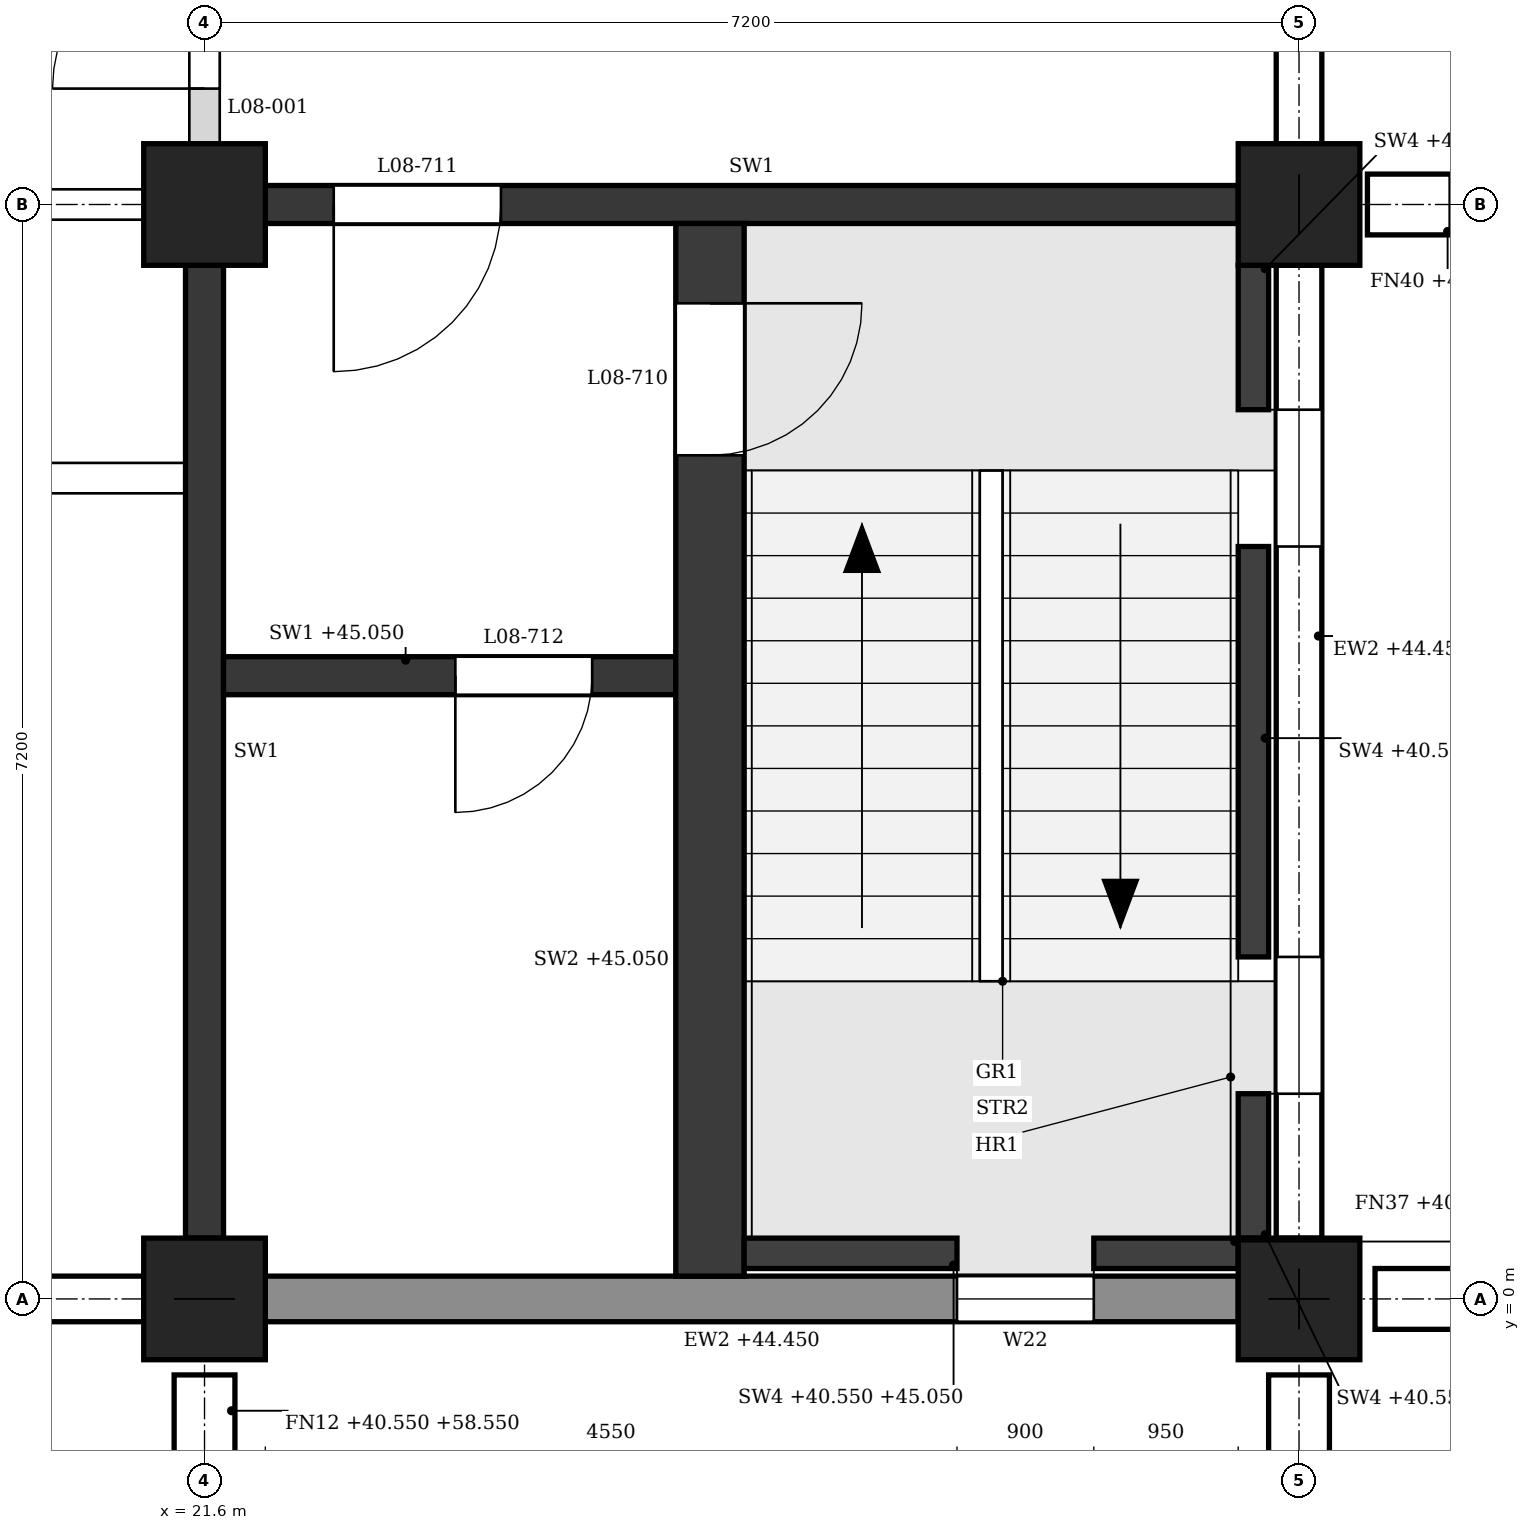
"""IFC4 building model, lengths in metres.
Left out: names, types, materials, properties, quantities, classifications, styles, units other than length and angle.
Written with IfcOpenShell. Run it as: python <this file> out.ifc"""

import sys

from ifc_helpers import new_model, si_unit, direction, frame, frame_2d, origin, origin_2d, place, context, subcontext, project, spatial, polyline, rectangle, outline, extrude, element, fill, save


model = new_model("IFC4")
c1 = context("Model", 3, precision=1e-05, world=origin(), true_north=direction((0.0, 1.0)))
c2 = subcontext(c1, "Body", "Model", "MODEL_VIEW")
j1 = project(units=[si_unit("LENGTHUNIT", "METRE"), si_unit("PLANEANGLEUNIT", "RADIAN")], contexts=[c1])
p1 = place(None, origin())
s1 = spatial("IfcSite", under=j1, at=p1, CompositionType="ELEMENT")
p2 = place(p1, origin())
s2 = spatial("IfcBuilding", under=s1, at=p2, CompositionType="ELEMENT")
p3 = place(p2, frame((0.0, 0.0, 40.8)))
s3 = spatial("IfcBuildingStorey", under=s2, at=p3, CompositionType="ELEMENT", Elevation=40.8)
for number, where, z_axis, x_axis in (
    (1, (21.6, 0.0, 0.0), (0.0, 0.0, 1.0), (1.0, 0.0, 0.0)),
    (2, (21.6, 7.2, 0.0), (0.0, 0.0, 1.0), (1.0, 0.0, 0.0)),
    (3, (28.8, 0.0, 0.0), (0.0, 0.0, 1.0), (1.0, 0.0, 0.0)),
    (4, (28.8, 7.2, 0.0), (0.0, 0.0, 1.0), (1.0, 0.0, 0.0)),
):
    element("IfcColumn", number, at=place(p3, frame(where, z_axis=z_axis, x_axis=x_axis)), inside=s3, PredefinedType="COLUMN", context=c2, shape_type="SweptSolid", body=[
        extrude(rectangle(XDim=0.8, YDim=0.8, at=origin_2d()), origin(), (0.0, 0.0, 1.0), 4.5),
    ])
p4 = place(p3, frame((14.8, 0.0, 0.0), z_axis=(0.0, 0.0, 1.0), x_axis=(1.0, 0.0, 0.0)))
e5 = element("IfcWall", 5, at=p4, inside=s3, PredefinedType="STANDARD", context=c2, shape_type="SweptSolid", body=[
    extrude(rectangle(XDim=6.4, YDim=0.3, at=frame_2d((3.2, 0.0))), origin(), (0.0, 0.0, 1.0), 3.65),
])
p5 = place(p4, frame((0.65, 0.0, 0.9)))
e6 = element("IfcOpeningElement", 6, at=p5, cuts=e5, PredefinedType="OPENING", context=c2, shape_type="SweptSolid", body=[
    extrude(outline(polyline([(0.0, 0.0), (1.5, 0.0), (1.5, 1.95), (0.75, 2.7), (0.0, 1.95), (0.0, 0.0)])), frame((0.0, 0.16, 0.0), z_axis=(0.0, -1.0, 0.0), x_axis=(1.0, 0.0, 0.0)), (0.0, 0.0, 1.0), 0.32),
])
p6 = place(p4, frame((4.25, 0.0, 0.9)))
e7 = element("IfcOpeningElement", 7, at=p6, cuts=e5, PredefinedType="OPENING", context=c2, shape_type="SweptSolid", body=[
    extrude(outline(polyline([(0.0, 0.0), (1.5, 0.0), (1.5, 1.95), (0.75, 2.7), (0.0, 1.95), (0.0, 0.0)])), frame((0.0, 0.16, 0.0), z_axis=(0.0, -1.0, 0.0), x_axis=(1.0, 0.0, 0.0)), (0.0, 0.0, 1.0), 0.32),
])
p7 = place(p3, frame((22.0, 0.0, 0.0), z_axis=(0.0, 0.0, 1.0), x_axis=(1.0, 0.0, 0.0)))
e8 = element("IfcWall", 8, at=p7, inside=s3, PredefinedType="STANDARD", context=c2, shape_type="SweptSolid", body=[
    extrude(rectangle(XDim=6.4, YDim=0.3, at=frame_2d((3.2, 0.0))), origin(), (0.0, 0.0, 1.0), 3.65),
])
p8 = place(p7, frame((4.55, 0.0, 0.9)))
e9 = element("IfcOpeningElement", 9, at=p8, cuts=e8, PredefinedType="OPENING", context=c2, shape_type="SweptSolid", body=[
    extrude(outline(polyline([(0.0, 0.0), (0.9, 0.0), (0.9, 2.25), (0.45, 2.7), (0.0, 2.25), (0.0, 0.0)])), frame((0.0, 0.16, 0.0), z_axis=(0.0, -1.0, 0.0), x_axis=(1.0, 0.0, 0.0)), (0.0, 0.0, 1.0), 0.32),
])
p9 = place(p3, frame((28.8, 0.4, 0.0), z_axis=(0.0, 0.0, 1.0), x_axis=(0.0, 1.0, 0.0)))
e10 = element("IfcWall", 10, at=p9, inside=s3, PredefinedType="STANDARD", context=c2, shape_type="SweptSolid", body=[
    extrude(rectangle(XDim=6.4, YDim=0.3, at=frame_2d((3.2, 0.0))), origin(), (0.0, 0.0, 1.0), 3.65),
])
p10 = place(p9, frame((0.95, 0.0, 0.9)))
e11 = element("IfcOpeningElement", 11, at=p10, cuts=e10, PredefinedType="OPENING", context=c2, shape_type="SweptSolid", body=[
    extrude(outline(polyline([(0.0, 0.0), (0.9, 0.0), (0.9, 2.25), (0.45, 2.7), (0.0, 2.25), (0.0, 0.0)])), frame((0.0, 0.16, 0.0), z_axis=(0.0, -1.0, 0.0), x_axis=(1.0, 0.0, 0.0)), (0.0, 0.0, 1.0), 0.32),
])
p11 = place(p9, frame((4.55, 0.0, 0.9)))
e12 = element("IfcOpeningElement", 12, at=p11, cuts=e10, PredefinedType="OPENING", context=c2, shape_type="SweptSolid", body=[
    extrude(outline(polyline([(0.0, 0.0), (0.9, 0.0), (0.9, 2.25), (0.45, 2.7), (0.0, 2.25), (0.0, 0.0)])), frame((0.0, 0.16, 0.0), z_axis=(0.0, -1.0, 0.0), x_axis=(1.0, 0.0, 0.0)), (0.0, 0.0, 1.0), 0.32),
])
p12 = place(p3, frame((28.8, 7.6, 0.0), z_axis=(0.0, 0.0, 1.0), x_axis=(0.0, 1.0, 0.0)))
e13 = element("IfcWall", 13, at=p12, inside=s3, PredefinedType="STANDARD", context=c2, shape_type="SweptSolid", body=[
    extrude(rectangle(XDim=6.4, YDim=0.3, at=frame_2d((3.2, 0.0))), origin(), (0.0, 0.0, 1.0), 3.65),
])
p13 = place(p12, frame((0.65, 0.0, 0.9)))
e14 = element("IfcOpeningElement", 14, at=p13, cuts=e13, PredefinedType="OPENING", context=c2, shape_type="SweptSolid", body=[
    extrude(outline(polyline([(0.0, 0.0), (1.5, 0.0), (1.5, 1.95), (0.75, 2.7), (0.0, 1.95), (0.0, 0.0)])), frame((0.0, 0.16, 0.0), z_axis=(0.0, -1.0, 0.0), x_axis=(1.0, 0.0, 0.0)), (0.0, 0.0, 1.0), 0.32),
])
for number, where, z_axis, x_axis in (
    (15, (21.6, -0.5, -0.25), (0.0, 0.0, 1.0), (0.0, -1.0, 0.0)),
    (16, (28.8, -0.5, -0.25), (0.0, 0.0, 1.0), (0.0, -1.0, 0.0)),
):
    element("IfcWall", number, at=place(p3, frame(where, z_axis=z_axis, x_axis=x_axis)), inside=s3, PredefinedType="POLYGONAL", context=c2, shape_type="SweptSolid", body=[
        extrude(outline(polyline([(0.65, 0.0), (0.65, 17.775), (0.5, 18.0), (0.0, 18.0), (0.0, 0.0), (0.65, 0.0)])), frame((0.0, 0.2, 0.0), z_axis=(0.0, -1.0, 0.0), x_axis=(1.0, 0.0, 0.0)), (0.0, 0.0, 1.0), 0.4),
    ])
for number, where, z_axis, x_axis in (
    (17, (29.3, 0.0, -0.25), (0.0, 0.0, 1.0), (1.0, 0.0, 0.0)),
    (18, (29.25, 7.2, -0.25), (0.0, 0.0, 1.0), (1.0, 0.0, 0.0)),
):
    element("IfcWall", number, at=place(p3, frame(where, z_axis=z_axis, x_axis=x_axis)), inside=s3, PredefinedType="POLYGONAL", context=c2, shape_type="SweptSolid", body=[
        extrude(outline(polyline([(0.55, 0.0), (0.55, 17.925), (0.5, 18.0), (0.0, 18.0), (0.0, 0.0), (0.55, 0.0)])), frame((0.0, 0.2, 0.0), z_axis=(0.0, -1.0, 0.0), x_axis=(1.0, 0.0, 0.0)), (0.0, 0.0, 1.0), 0.4),
    ])
p14 = place(p3, frame((22.0, 7.2, 0.0), z_axis=(0.0, 0.0, 1.0), x_axis=(1.0, 0.0, 0.0)))
e19 = element("IfcWall", 19, at=p14, inside=s3, PredefinedType="SHEAR", context=c2, shape_type="SweptSolid", body=[
    extrude(rectangle(XDim=6.4, YDim=0.25, at=frame_2d((3.2, 0.0))), origin(), (0.0, 0.0, 1.0), 3.55),
])
p15 = place(p14, frame((0.45, 0.0, 0.0)))
e20 = element("IfcOpeningElement", 20, at=p15, cuts=e19, PredefinedType="OPENING", context=c2, shape_type="SweptSolid", body=[
    extrude(rectangle(XDim=1.1, YDim=2.1, at=frame_2d((0.55, 1.05))), frame((0.0, 0.135, 0.0), z_axis=(0.0, -1.0, 0.0), x_axis=(1.0, 0.0, 0.0)), (0.0, 0.0, 1.0), 0.27),
])
p16 = place(p3, frame((21.6, 0.4, 0.0), z_axis=(0.0, 0.0, 1.0), x_axis=(0.0, 1.0, 0.0)))
e21 = element("IfcWall", 21, at=p16, inside=s3, PredefinedType="SHEAR", context=c2, shape_type="SweptSolid", body=[
    extrude(rectangle(XDim=6.4, YDim=0.25, at=frame_2d((3.2, 0.0))), origin(), (0.0, 0.0, 1.0), 3.55),
])
p17 = place(p3, frame((28.5, 0.4, -0.25), z_axis=(0.0, 0.0, 1.0), x_axis=(0.0, 1.0, 0.0)))
e22 = element("IfcWall", 22, at=p17, inside=s3, PredefinedType="SHEAR", context=c2, shape_type="SweptSolid", body=[
    extrude(rectangle(XDim=0.95, YDim=0.2, at=frame_2d((0.475, 0.0))), origin(), (0.0, 0.0, 1.0), 4.5),
])
p18 = place(p3, frame((28.5, 2.25, -0.25), z_axis=(0.0, 0.0, 1.0), x_axis=(0.0, 1.0, 0.0)))
e23 = element("IfcWall", 23, at=p18, inside=s3, PredefinedType="SHEAR", context=c2, shape_type="SweptSolid", body=[
    extrude(rectangle(XDim=2.7, YDim=0.2, at=frame_2d((1.35, 0.0))), origin(), (0.0, 0.0, 1.0), 4.5),
])
p19 = place(p3, frame((28.5, 5.85, -0.25), z_axis=(0.0, 0.0, 1.0), x_axis=(0.0, 1.0, 0.0)))
e24 = element("IfcWall", 24, at=p19, inside=s3, PredefinedType="SHEAR", context=c2, shape_type="SweptSolid", body=[
    extrude(rectangle(XDim=0.95, YDim=0.2, at=frame_2d((0.475, 0.0))), origin(), (0.0, 0.0, 1.0), 4.5),
])
p20 = place(p3, frame((25.15, 0.3, -0.25), z_axis=(0.0, 0.0, 1.0), x_axis=(1.0, 0.0, 0.0)))
e25 = element("IfcWall", 25, at=p20, inside=s3, PredefinedType="SHEAR", context=c2, shape_type="SweptSolid", body=[
    extrude(rectangle(XDim=1.4, YDim=0.2, at=frame_2d((0.7, 0.0))), origin(), (0.0, 0.0, 1.0), 4.5),
])
p21 = place(p3, frame((27.45, 0.3, -0.25), z_axis=(0.0, 0.0, 1.0), x_axis=(1.0, 0.0, 0.0)))
e26 = element("IfcWall", 26, at=p21, inside=s3, PredefinedType="SHEAR", context=c2, shape_type="SweptSolid", body=[
    extrude(rectangle(XDim=0.95, YDim=0.2, at=frame_2d((0.475, 0.0))), origin(), (0.0, 0.0, 1.0), 4.5),
])
p22 = place(p3, frame((24.925, 0.15, 0.0), z_axis=(0.0, 0.0, 1.0), x_axis=(0.0, 1.0, 0.0)))
e27 = element("IfcWall", 27, at=p22, inside=s3, PredefinedType="SHEAR", context=c2, shape_type="SweptSolid", body=[
    extrude(rectangle(XDim=6.925, YDim=0.45, at=frame_2d((3.462, 0.0))), origin(), (0.0, 0.0, 1.0), 4.25),
])
p23 = place(p22, frame((5.4, 0.0, 0.0)))
e28 = element("IfcOpeningElement", 28, at=p23, cuts=e27, PredefinedType="OPENING", context=c2, shape_type="SweptSolid", body=[
    extrude(rectangle(XDim=1.0, YDim=2.1, at=frame_2d((0.5, 1.05))), frame((0.0, 0.235, 0.0), z_axis=(0.0, -1.0, 0.0), x_axis=(1.0, 0.0, 0.0)), (0.0, 0.0, 1.0), 0.47),
])
p24 = place(p3, frame((21.725, 4.1, 0.0), z_axis=(0.0, 0.0, 1.0), x_axis=(1.0, 0.0, 0.0)))
e29 = element("IfcWall", 29, at=p24, inside=s3, PredefinedType="SHEAR", context=c2, shape_type="SweptSolid", body=[
    extrude(rectangle(XDim=2.975, YDim=0.25, at=frame_2d((1.487, 0.0))), origin(), (0.0, 0.0, 1.0), 4.25),
])
p25 = place(p24, frame((1.525, 0.0, 0.0)))
e30 = element("IfcOpeningElement", 30, at=p25, cuts=e29, PredefinedType="OPENING", context=c2, shape_type="SweptSolid", body=[
    extrude(rectangle(XDim=0.9, YDim=2.1, at=frame_2d((0.45, 1.05))), frame((0.0, 0.135, 0.0), z_axis=(0.0, -1.0, 0.0), x_axis=(1.0, 0.0, 0.0)), (0.0, 0.0, 1.0), 0.27),
])
p26 = place(p3, frame((7.325, 5.4, 0.0), z_axis=(0.0, 0.0, 1.0), x_axis=(1.0, 0.0, 0.0)))
e31 = element("IfcWall", 31, at=p26, inside=s3, PredefinedType="PARTITIONING", context=c2, shape_type="SweptSolid", body=[
    extrude(outline(polyline([(0.0, 0.0), (14.15, 0.0), (14.15, 3.55), (14.05, 3.55), (14.05, 4.25), (7.3, 4.25), (7.3, 3.55), (6.85, 3.55), (6.85, 4.25), (0.1, 4.25), (0.1, 3.55), (0.0, 3.55), (0.0, 0.0)])), frame((0.0, 0.1, 0.0), z_axis=(0.0, -1.0, 0.0), x_axis=(1.0, 0.0, 0.0)), (0.0, 0.0, 1.0), 0.2),
])
p27 = place(p26, frame((1.238, 0.0, 0.0)))
e32 = element("IfcOpeningElement", 32, at=p27, cuts=e31, PredefinedType="OPENING", context=c2, shape_type="SweptSolid", body=[
    extrude(rectangle(XDim=1.0, YDim=2.1, at=frame_2d((0.5, 1.05))), frame((0.0, 0.11, 0.0), z_axis=(0.0, -1.0, 0.0), x_axis=(1.0, 0.0, 0.0)), (0.0, 0.0, 1.0), 0.22),
])
p28 = place(p26, frame((4.775, 0.0, 0.0)))
e33 = element("IfcOpeningElement", 33, at=p28, cuts=e31, PredefinedType="OPENING", context=c2, shape_type="SweptSolid", body=[
    extrude(rectangle(XDim=1.0, YDim=2.1, at=frame_2d((0.5, 1.05))), frame((0.0, 0.11, 0.0), z_axis=(0.0, -1.0, 0.0), x_axis=(1.0, 0.0, 0.0)), (0.0, 0.0, 1.0), 0.22),
])
p29 = place(p26, frame((8.375, 0.0, 0.0)))
e34 = element("IfcOpeningElement", 34, at=p29, cuts=e31, PredefinedType="OPENING", context=c2, shape_type="SweptSolid", body=[
    extrude(rectangle(XDim=1.0, YDim=2.1, at=frame_2d((0.5, 1.05))), frame((0.0, 0.11, 0.0), z_axis=(0.0, -1.0, 0.0), x_axis=(1.0, 0.0, 0.0)), (0.0, 0.0, 1.0), 0.22),
])
p30 = place(p26, frame((11.913, 0.0, 0.0)))
e35 = element("IfcOpeningElement", 35, at=p30, cuts=e31, PredefinedType="OPENING", context=c2, shape_type="SweptSolid", body=[
    extrude(rectangle(XDim=1.0, YDim=2.1, at=frame_2d((0.5, 1.05))), frame((0.0, 0.11, 0.0), z_axis=(0.0, -1.0, 0.0), x_axis=(1.0, 0.0, 0.0)), (0.0, 0.0, 1.0), 0.22),
])
p31 = place(p3, frame((14.8, 7.2, 0.0), z_axis=(0.0, 0.0, 1.0), x_axis=(1.0, 0.0, 0.0)))
e36 = element("IfcWall", 36, at=p31, inside=s3, PredefinedType="PARTITIONING", context=c2, shape_type="SweptSolid", body=[
    extrude(rectangle(XDim=6.4, YDim=0.2, at=frame_2d((3.2, 0.0))), origin(), (0.0, 0.0, 1.0), 3.55),
])
p32 = place(p31, frame((4.3, 0.0, 0.0)))
e37 = element("IfcOpeningElement", 37, at=p32, cuts=e36, PredefinedType="OPENING", context=c2, shape_type="SweptSolid", body=[
    extrude(rectangle(XDim=1.0, YDim=2.1, at=frame_2d((0.5, 1.05))), frame((0.0, 0.11, 0.0), z_axis=(0.0, -1.0, 0.0), x_axis=(1.0, 0.0, 0.0)), (0.0, 0.0, 1.0), 0.22),
])
p33 = place(p3, frame((21.6, 7.6, 0.0), z_axis=(0.0, 0.0, 1.0), x_axis=(0.0, 1.0, 0.0)))
e38 = element("IfcWall", 38, at=p33, inside=s3, PredefinedType="PARTITIONING", context=c2, shape_type="SweptSolid", body=[
    extrude(rectangle(XDim=2.725, YDim=0.2, at=frame_2d((1.362, 0.0))), origin(), (0.0, 0.0, 1.0), 3.55),
])
p34 = place(p33, frame((0.362, 0.0, 0.0)))
e39 = element("IfcOpeningElement", 39, at=p34, cuts=e38, PredefinedType="OPENING", context=c2, shape_type="SweptSolid", body=[
    extrude(rectangle(XDim=2.0, YDim=2.4, at=frame_2d((1.0, 1.2))), frame((0.0, 0.11, 0.0), z_axis=(0.0, -1.0, 0.0), x_axis=(1.0, 0.0, 0.0)), (0.0, 0.0, 1.0), 0.22),
])
p35 = place(p10, origin())
e40 = element("IfcWindow", 40, at=p35, inside=s3, PartitioningType="SINGLE_PANEL", PredefinedType="WINDOW", context=c2, shape_type="SweptSolid", body=[
    extrude(outline(polyline([(0.0, 0.0), (0.9, 0.0), (0.9, 2.25), (0.45, 2.7), (0.0, 2.25), (0.0, 0.0)])), frame((0.0, 0.03, 0.0), z_axis=(0.0, -1.0, 0.0), x_axis=(1.0, 0.0, 0.0)), (0.0, 0.0, 1.0), 0.06),
])
fill(e11, e40)
p36 = place(p11, origin())
e41 = element("IfcWindow", 41, at=p36, inside=s3, PartitioningType="SINGLE_PANEL", PredefinedType="WINDOW", context=c2, shape_type="SweptSolid", body=[
    extrude(outline(polyline([(0.0, 0.0), (0.9, 0.0), (0.9, 2.25), (0.45, 2.7), (0.0, 2.25), (0.0, 0.0)])), frame((0.0, 0.03, 0.0), z_axis=(0.0, -1.0, 0.0), x_axis=(1.0, 0.0, 0.0)), (0.0, 0.0, 1.0), 0.06),
])
fill(e12, e41)
p37 = place(p8, origin())
e42 = element("IfcWindow", 42, at=p37, inside=s3, PartitioningType="SINGLE_PANEL", PredefinedType="WINDOW", context=c2, shape_type="SweptSolid", body=[
    extrude(outline(polyline([(0.0, 0.0), (0.9, 0.0), (0.9, 2.25), (0.45, 2.7), (0.0, 2.25), (0.0, 0.0)])), frame((0.0, 0.03, 0.0), z_axis=(0.0, -1.0, 0.0), x_axis=(1.0, 0.0, 0.0)), (0.0, 0.0, 1.0), 0.06),
])
fill(e9, e42)
p38 = place(p23, frame((1.0, 0.0, 0.0), z_axis=(0.0, 0.0, 1.0), x_axis=(-1.0, 0.0, 0.0)))
e43 = element("IfcDoor", 43, at=p38, inside=s3, OperationType="SINGLE_SWING_LEFT", PredefinedType="DOOR", context=c2, shape_type="SweptSolid", body=[
    extrude(rectangle(XDim=1.0, YDim=2.1, at=frame_2d((0.5, 1.05))), frame((0.0, 0.025, 0.0), z_axis=(0.0, -1.0, 0.0), x_axis=(1.0, 0.0, 0.0)), (0.0, 0.0, 1.0), 0.05),
])
fill(e28, e43)
p39 = place(p15, frame((1.1, 0.0, 0.0), z_axis=(0.0, 0.0, 1.0), x_axis=(-1.0, 0.0, 0.0)))
e44 = element("IfcDoor", 44, at=p39, inside=s3, OperationType="SINGLE_SWING_RIGHT", PredefinedType="DOOR", context=c2, shape_type="SweptSolid", body=[
    extrude(rectangle(XDim=1.1, YDim=2.1, at=frame_2d((0.55, 1.05))), frame((0.0, 0.025, 0.0), z_axis=(0.0, -1.0, 0.0), x_axis=(1.0, 0.0, 0.0)), (0.0, 0.0, 1.0), 0.05),
])
fill(e20, e44)
p40 = place(p25, frame((0.9, 0.0, 0.0), z_axis=(0.0, 0.0, 1.0), x_axis=(-1.0, 0.0, 0.0)))
e45 = element("IfcDoor", 45, at=p40, inside=s3, OperationType="SINGLE_SWING_RIGHT", PredefinedType="DOOR", context=c2, shape_type="SweptSolid", body=[
    extrude(rectangle(XDim=0.9, YDim=2.1, at=frame_2d((0.45, 1.05))), frame((0.0, 0.025, 0.0), z_axis=(0.0, -1.0, 0.0), x_axis=(1.0, 0.0, 0.0)), (0.0, 0.0, 1.0), 0.05),
])
fill(e30, e45)
p41 = place(p34, origin())
e46 = element("IfcDoor", 46, at=p41, inside=s3, OperationType="DOUBLE_DOOR_SINGLE_SWING", PredefinedType="DOOR", context=c2, shape_type="SweptSolid", body=[
    extrude(rectangle(XDim=2.0, YDim=2.4, at=frame_2d((1.0, 1.2))), frame((0.0, 0.025, 0.0), z_axis=(0.0, -1.0, 0.0), x_axis=(1.0, 0.0, 0.0)), (0.0, 0.0, 1.0), 0.05),
])
fill(e39, e46)
save(model, sys.argv[1])
